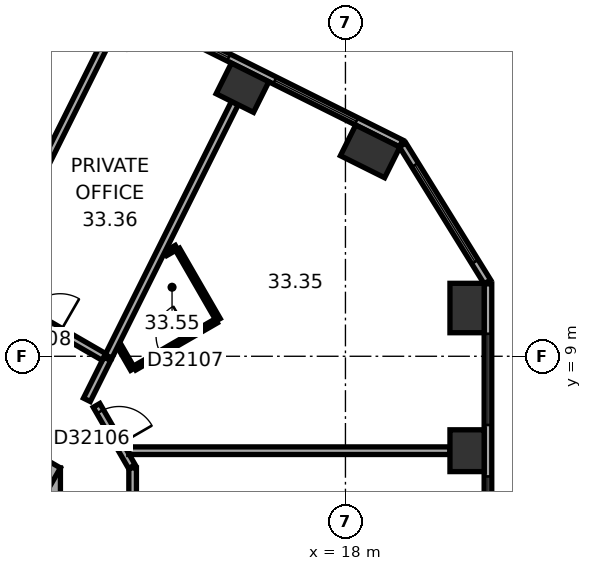
"""IFC4 building model, lengths in metres.
Left out: names, types, materials, properties, quantities, classifications, styles, units other than length and angle.
Written with IfcOpenShell. Run it as: python <this file> out.ifc"""

import sys

from ifc_helpers import new_model, si_unit, direction, frame, frame_2d, origin, origin_2d, place, context, subcontext, project, spatial, rectangle, extrude, element, fill, save


model = new_model("IFC4")
c1 = context("Model", 3, precision=1e-05, world=origin(), true_north=direction((0.0, 1.0)))
c2 = subcontext(c1, "Body", "Model", "MODEL_VIEW")
j1 = project(units=[si_unit("LENGTHUNIT", "METRE"), si_unit("PLANEANGLEUNIT", "RADIAN")], contexts=[c1])
p1 = place(None, origin())
s1 = spatial("IfcSite", under=j1, at=p1, CompositionType="ELEMENT")
p2 = place(p1, origin())
s2 = spatial("IfcBuilding", under=s1, at=p2, CompositionType="ELEMENT")
p3 = place(p2, frame((0.0, 0.0, 135.5)))
s3 = spatial("IfcBuildingStorey", under=s2, at=p3, CompositionType="ELEMENT", Elevation=135.5)
p4 = place(p3, frame((21.2, 6.515, 0.0), z_axis=(0.0, 0.0, 1.0), x_axis=(0.0, 1.0, 0.0)))
e1 = element("IfcColumn", 1, at=p4, inside=s3, PredefinedType="COLUMN", context=c2, shape_type="SweptSolid", body=[
    extrude(rectangle(XDim=1.1, YDim=0.9, at=origin_2d()), origin(), (0.0, 0.0, 1.0), 3.7),
])
for number, where, z_axis, x_axis in (
    (2, (21.2, 10.27, 0.0), (0.0, 0.0, 1.0), (0.0, 1.0, 0.0)),
    (3, (18.65, 14.39, 0.0), (0.0, 0.0, 1.0), (-0.895, 0.446, 0.0)),
):
    element("IfcColumn", number, at=place(p3, frame(where, z_axis=z_axis, x_axis=x_axis)), inside=s3, PredefinedType="COLUMN", context=c2, shape_type="SweptSolid", body=[
        extrude(rectangle(XDim=1.3, YDim=0.9, at=origin_2d()), origin(), (0.0, 0.0, 1.0), 3.7),
    ])
p5 = place(p3, frame((15.29, 16.065, 0.0), z_axis=(0.0, 0.0, 1.0), x_axis=(-0.894934361602, 0.44619781311, 0.0)))
e4 = element("IfcColumn", 4, at=p5, inside=s3, PredefinedType="COLUMN", context=c2, shape_type="SweptSolid", body=[
    extrude(rectangle(XDim=1.1, YDim=0.9, at=origin_2d()), origin(), (0.0, 0.0, 1.0), 3.7),
])
p6 = place(p3, frame((10.0, -6.062, 0.0), z_axis=(0.0, 0.0, 1.0), x_axis=(0.0, 1.0, 0.0)))
e5 = element("IfcWall", 5, at=p6, inside=s3, PredefinedType="SHEAR", context=c2, shape_type="SweptSolid", body=[
    extrude(rectangle(XDim=12.125, YDim=1.0, at=frame_2d((6.062, 0.0))), origin(), (0.0, 0.0, 1.0), 3.7),
])
p7 = place(p6, frame((6.262, 0.0, 0.0)))
e6 = element("IfcOpeningElement", 6, at=p7, cuts=e5, PredefinedType="OPENING", context=c2, shape_type="SweptSolid", body=[
    extrude(rectangle(XDim=1.5, YDim=2.1, at=frame_2d((0.75, 1.05))), frame((0.0, 0.51, 0.0), z_axis=(0.0, -1.0, 0.0), x_axis=(1.0, 0.0, 0.0)), (0.0, 0.0, 1.0), 1.02),
])
p8 = place(p6, frame((1.712, 0.0, 0.0)))
e7 = element("IfcOpeningElement", 7, at=p8, cuts=e5, PredefinedType="OPENING", context=c2, shape_type="SweptSolid", body=[
    extrude(rectangle(XDim=1.1, YDim=2.1, at=frame_2d((0.55, 1.05))), frame((0.0, 0.51, 0.0), z_axis=(0.0, -1.0, 0.0), x_axis=(1.0, 0.0, 0.0)), (0.0, 0.0, 1.0), 1.02),
])
p9 = place(p6, frame((4.312, 0.0, 0.0)))
e8 = element("IfcOpeningElement", 8, at=p9, cuts=e5, PredefinedType="OPENING", context=c2, shape_type="SweptSolid", body=[
    extrude(rectangle(XDim=1.1, YDim=2.1, at=frame_2d((0.55, 1.05))), frame((0.0, 0.51, 0.0), z_axis=(0.0, -1.0, 0.0), x_axis=(1.0, 0.0, 0.0)), (0.0, 0.0, 1.0), 1.02),
])
p10 = place(p3, frame((10.25, 5.629, 0.0), z_axis=(0.0, 0.0, 1.0), x_axis=(-0.866022616891, 0.50000482701, 0.0)))
e9 = element("IfcWall", 9, at=p10, inside=s3, PredefinedType="SHEAR", context=c2, shape_type="SweptSolid", body=[
    extrude(rectangle(XDim=12.125, YDim=1.0, at=frame_2d((6.062, 0.0))), origin(), (0.0, 0.0, 1.0), 3.7),
])
p11 = place(p10, frame((2.612, 0.0, 0.0)))
e10 = element("IfcOpeningElement", 10, at=p11, cuts=e9, PredefinedType="OPENING", context=c2, shape_type="SweptSolid", body=[
    extrude(rectangle(XDim=1.1, YDim=2.1, at=frame_2d((0.55, 1.05))), frame((0.0, 0.51, 0.0), z_axis=(0.0, -1.0, 0.0), x_axis=(1.0, 0.0, 0.0)), (0.0, 0.0, 1.0), 1.02),
])
p12 = place(p10, frame((5.212, 0.0, 0.0)))
e11 = element("IfcOpeningElement", 11, at=p12, cuts=e9, PredefinedType="OPENING", context=c2, shape_type="SweptSolid", body=[
    extrude(rectangle(XDim=1.1, YDim=2.1, at=frame_2d((0.55, 1.05))), frame((0.0, 0.51, 0.0), z_axis=(0.0, -1.0, 0.0), x_axis=(1.0, 0.0, 0.0)), (0.0, 0.0, 1.0), 1.02),
])
p13 = place(p10, frame((7.812, 0.0, 0.0)))
e12 = element("IfcOpeningElement", 12, at=p13, cuts=e9, PredefinedType="OPENING", context=c2, shape_type="SweptSolid", body=[
    extrude(rectangle(XDim=1.1, YDim=2.1, at=frame_2d((0.55, 1.05))), frame((0.0, 0.51, 0.0), z_axis=(0.0, -1.0, 0.0), x_axis=(1.0, 0.0, 0.0)), (0.0, 0.0, 1.0), 1.02),
])
p14 = place(p3, frame((21.75, -9.138, 0.0), z_axis=(0.0, 0.0, 1.0), x_axis=(0.0, 1.0, 0.0)))
e13 = element("IfcWall", 13, at=p14, inside=s3, PredefinedType="STANDARD", context=c2, shape_type="SweptSolid", body=[
    extrude(rectangle(XDim=20.044, YDim=0.2, at=frame_2d((10.022, 0.0))), origin(), (0.0, 0.0, 1.0), 3.7),
])
p15 = place(p14, frame((1.314, 0.0, 0.9)))
e14 = element("IfcOpeningElement", 14, at=p15, cuts=e13, PredefinedType="OPENING", context=c2, shape_type="SweptSolid", body=[
    extrude(rectangle(XDim=2.4, YDim=2.0, at=frame_2d((1.2, 1.0))), frame((0.0, 0.11, 0.0), z_axis=(0.0, -1.0, 0.0), x_axis=(1.0, 0.0, 0.0)), (0.0, 0.0, 1.0), 0.22),
])
p16 = place(p14, frame((5.069, 0.0, 0.9)))
e15 = element("IfcOpeningElement", 15, at=p16, cuts=e13, PredefinedType="OPENING", context=c2, shape_type="SweptSolid", body=[
    extrude(rectangle(XDim=2.4, YDim=2.0, at=frame_2d((1.2, 1.0))), frame((0.0, 0.11, 0.0), z_axis=(0.0, -1.0, 0.0), x_axis=(1.0, 0.0, 0.0)), (0.0, 0.0, 1.0), 0.22),
])
p17 = place(p14, frame((8.823, 0.0, 0.9)))
e16 = element("IfcOpeningElement", 16, at=p17, cuts=e13, PredefinedType="OPENING", context=c2, shape_type="SweptSolid", body=[
    extrude(rectangle(XDim=2.4, YDim=2.0, at=frame_2d((1.2, 1.0))), frame((0.0, 0.11, 0.0), z_axis=(0.0, -1.0, 0.0), x_axis=(1.0, 0.0, 0.0)), (0.0, 0.0, 1.0), 0.22),
])
p18 = place(p14, frame((12.577, 0.0, 0.9)))
e17 = element("IfcOpeningElement", 17, at=p18, cuts=e13, PredefinedType="OPENING", context=c2, shape_type="SweptSolid", body=[
    extrude(rectangle(XDim=2.4, YDim=2.0, at=frame_2d((1.2, 1.0))), frame((0.0, 0.11, 0.0), z_axis=(0.0, -1.0, 0.0), x_axis=(1.0, 0.0, 0.0)), (0.0, 0.0, 1.0), 0.22),
])
p19 = place(p14, frame((16.331, 0.0, 0.9)))
e18 = element("IfcOpeningElement", 18, at=p19, cuts=e13, PredefinedType="OPENING", context=c2, shape_type="SweptSolid", body=[
    extrude(rectangle(XDim=2.4, YDim=2.0, at=frame_2d((1.2, 1.0))), frame((0.0, 0.11, 0.0), z_axis=(0.0, -1.0, 0.0), x_axis=(1.0, 0.0, 0.0)), (0.0, 0.0, 1.0), 0.22),
])
p20 = place(p3, frame((21.735, 10.958, 0.0), z_axis=(0.0, 0.0, 1.0), x_axis=(-0.526213807775, 0.850352296702, 0.0)))
e19 = element("IfcWall", 19, at=p20, inside=s3, PredefinedType="STANDARD", context=c2, shape_type="SweptSolid", body=[
    extrude(rectangle(XDim=4.238, YDim=0.2, at=frame_2d((2.119, 0.0))), origin(), (0.0, 0.0, 1.0), 3.7),
])
p21 = place(p20, frame((0.619, 0.0, 0.9)))
e20 = element("IfcOpeningElement", 20, at=p21, cuts=e19, PredefinedType="OPENING", context=c2, shape_type="SweptSolid", body=[
    extrude(rectangle(XDim=3.0, YDim=2.0, at=frame_2d((1.5, 1.0))), frame((0.0, 0.11, 0.0), z_axis=(0.0, -1.0, 0.0), x_axis=(1.0, 0.0, 0.0)), (0.0, 0.0, 1.0), 0.22),
])
p22 = place(p3, frame((19.464, 14.599, 0.0), z_axis=(0.0, 0.0, 1.0), x_axis=(-0.894935755043, 0.446195018289, 0.0)))
e21 = element("IfcWall", 21, at=p22, inside=s3, PredefinedType="STANDARD", context=c2, shape_type="SweptSolid", body=[
    extrude(rectangle(XDim=20.044, YDim=0.2, at=frame_2d((10.022, 0.0))), origin(), (0.0, 0.0, 1.0), 3.7),
])
p23 = place(p22, frame((1.313, 0.0, 0.9)))
e22 = element("IfcOpeningElement", 22, at=p23, cuts=e21, PredefinedType="OPENING", context=c2, shape_type="SweptSolid", body=[
    extrude(rectangle(XDim=2.4, YDim=2.0, at=frame_2d((1.2, 1.0))), frame((0.0, 0.11, 0.0), z_axis=(0.0, -1.0, 0.0), x_axis=(1.0, 0.0, 0.0)), (0.0, 0.0, 1.0), 0.22),
])
p24 = place(p22, frame((5.067, 0.0, 0.9)))
e23 = element("IfcOpeningElement", 23, at=p24, cuts=e21, PredefinedType="OPENING", context=c2, shape_type="SweptSolid", body=[
    extrude(rectangle(XDim=2.4, YDim=2.0, at=frame_2d((1.2, 1.0))), frame((0.0, 0.11, 0.0), z_axis=(0.0, -1.0, 0.0), x_axis=(1.0, 0.0, 0.0)), (0.0, 0.0, 1.0), 0.22),
])
p25 = place(p22, frame((8.821, 0.0, 0.9)))
e24 = element("IfcOpeningElement", 24, at=p25, cuts=e21, PredefinedType="OPENING", context=c2, shape_type="SweptSolid", body=[
    extrude(rectangle(XDim=2.4, YDim=2.0, at=frame_2d((1.2, 1.0))), frame((0.0, 0.11, 0.0), z_axis=(0.0, -1.0, 0.0), x_axis=(1.0, 0.0, 0.0)), (0.0, 0.0, 1.0), 0.22),
])
p26 = place(p22, frame((12.575, 0.0, 0.9)))
e25 = element("IfcOpeningElement", 25, at=p26, cuts=e21, PredefinedType="OPENING", context=c2, shape_type="SweptSolid", body=[
    extrude(rectangle(XDim=2.4, YDim=2.0, at=frame_2d((1.2, 1.0))), frame((0.0, 0.11, 0.0), z_axis=(0.0, -1.0, 0.0), x_axis=(1.0, 0.0, 0.0)), (0.0, 0.0, 1.0), 0.22),
])
p27 = place(p22, frame((16.329, 0.0, 0.9)))
e26 = element("IfcOpeningElement", 26, at=p27, cuts=e21, PredefinedType="OPENING", context=c2, shape_type="SweptSolid", body=[
    extrude(rectangle(XDim=2.4, YDim=2.0, at=frame_2d((1.2, 1.0))), frame((0.0, 0.11, 0.0), z_axis=(0.0, -1.0, 0.0), x_axis=(1.0, 0.0, 0.0)), (0.0, 0.0, 1.0), 0.22),
])
p28 = place(p3, frame((11.196, 7.854, 0.0), z_axis=(0.0, 0.0, 1.0), x_axis=(0.446241040303, 0.894912808015, 0.0)))
e27 = element("IfcWall", 27, at=p28, inside=s3, PredefinedType="PARTITIONING", context=c2, shape_type="SweptSolid", body=[
    extrude(rectangle(XDim=1.205, YDim=0.2, at=frame_2d((0.603, 0.0))), origin(), (0.0, 0.0, 1.0), 3.35),
])
p29 = place(p3, frame((11.646, 8.981, 0.0), z_axis=(0.0, 0.0, 1.0), x_axis=(-0.866027142779, 0.499996987961, 0.0)))
e28 = element("IfcWall", 28, at=p29, inside=s3, PredefinedType="PARTITIONING", context=c2, shape_type="SweptSolid", body=[
    extrude(rectangle(XDim=9.597, YDim=0.2, at=frame_2d((4.798, 0.0))), origin(), (0.0, 0.0, 1.0), 3.35),
])
p30 = place(p29, frame((1.331, 0.0, 0.0)))
e29 = element("IfcOpeningElement", 29, at=p30, cuts=e28, PredefinedType="OPENING", context=c2, shape_type="SweptSolid", body=[
    extrude(rectangle(XDim=1.0, YDim=2.1, at=frame_2d((0.5, 1.05))), frame((0.0, 0.11, 0.0), z_axis=(0.0, -1.0, 0.0), x_axis=(1.0, 0.0, 0.0)), (0.0, 0.0, 1.0), 0.22),
])
p31 = place(p29, frame((5.042, 0.0, 0.0)))
e30 = element("IfcOpeningElement", 30, at=p31, cuts=e28, PredefinedType="OPENING", context=c2, shape_type="SweptSolid", body=[
    extrude(rectangle(XDim=1.0, YDim=2.1, at=frame_2d((0.5, 1.05))), frame((0.0, 0.11, 0.0), z_axis=(0.0, -1.0, 0.0), x_axis=(1.0, 0.0, 0.0)), (0.0, 0.0, 1.0), 0.22),
])
p32 = place(p29, frame((8.01, 0.0, 0.0)))
e31 = element("IfcOpeningElement", 31, at=p32, cuts=e28, PredefinedType="OPENING", context=c2, shape_type="SweptSolid", body=[
    extrude(rectangle(XDim=1.0, YDim=2.1, at=frame_2d((0.5, 1.05))), frame((0.0, 0.11, 0.0), z_axis=(0.0, -1.0, 0.0), x_axis=(1.0, 0.0, 0.0)), (0.0, 0.0, 1.0), 0.22),
])
p33 = place(p3, frame((11.73, 17.338, 0.0), z_axis=(0.0, 0.0, 1.0), x_axis=(-0.446193589186, -0.894936467561, 0.0)))
e32 = element("IfcWall", 32, at=p33, inside=s3, PredefinedType="PARTITIONING", context=c2, shape_type="SweptSolid", body=[
    extrude(rectangle(XDim=7.183, YDim=0.2, at=frame_2d((3.591, 0.0))), origin(), (0.0, 0.0, 1.0), 2.55),
])
p34 = place(p3, frame((12.38, 6.097, 0.0), z_axis=(0.0, 0.0, 1.0), x_axis=(-0.499964847546, 0.866045698112, 0.0)))
e33 = element("IfcWall", 33, at=p34, inside=s3, PredefinedType="PARTITIONING", context=c2, shape_type="SweptSolid", body=[
    extrude(rectangle(XDim=1.86, YDim=0.2, at=frame_2d((0.93, 0.0))), origin(), (0.0, 0.0, 1.0), 3.35),
])
p35 = place(p34, frame((0.672, 0.0, 0.0)))
e34 = element("IfcOpeningElement", 34, at=p35, cuts=e33, PredefinedType="OPENING", context=c2, shape_type="SweptSolid", body=[
    extrude(rectangle(XDim=1.0, YDim=2.1, at=frame_2d((0.5, 1.05))), frame((0.0, 0.11, 0.0), z_axis=(0.0, -1.0, 0.0), x_axis=(1.0, 0.0, 0.0)), (0.0, 0.0, 1.0), 0.22),
])
p36 = place(p3, frame((12.4, 0.201, 0.0), z_axis=(0.0, 0.0, 1.0), x_axis=(0.0, 1.0, 0.0)))
e35 = element("IfcWall", 35, at=p36, inside=s3, PredefinedType="PARTITIONING", context=c2, shape_type="SweptSolid", body=[
    extrude(rectangle(XDim=5.861, YDim=0.2, at=frame_2d((2.931, 0.0))), origin(), (0.0, 0.0, 1.0), 3.35),
])
p37 = place(p36, frame((3.711, 0.0, 0.0)))
e36 = element("IfcOpeningElement", 36, at=p37, cuts=e35, PredefinedType="OPENING", context=c2, shape_type="SweptSolid", body=[
    extrude(rectangle(XDim=1.0, YDim=2.1, at=frame_2d((0.5, 1.05))), frame((0.0, 0.11, 0.0), z_axis=(0.0, -1.0, 0.0), x_axis=(1.0, 0.0, 0.0)), (0.0, 0.0, 1.0), 0.22),
])
p38 = place(p3, frame((12.401, 8.661, 0.0), z_axis=(0.0, 0.0, 1.0), x_axis=(-0.499831418649, 0.866122712398, 0.0)))
e37 = element("IfcWall", 37, at=p38, inside=s3, PredefinedType="PARTITIONING", context=c2, shape_type="SweptSolid", body=[
    extrude(rectangle(XDim=0.711, YDim=0.12, at=frame_2d((0.355, 0.0))), origin(), (0.0, 0.0, 1.0), 3.35),
])
p39 = place(p3, frame((13.269, 11.702, 0.0), z_axis=(0.0, 0.0, 1.0), x_axis=(0.865936922628, 0.500153222552, 0.0)))
e38 = element("IfcWall", 38, at=p39, inside=s3, PredefinedType="PARTITIONING", context=c2, shape_type="SweptSolid", body=[
    extrude(rectangle(XDim=0.327, YDim=0.12, at=frame_2d((0.164, 0.0))), origin(), (0.0, 0.0, 1.0), 3.35),
])
p40 = place(p3, frame((13.583, 11.814, 0.0), z_axis=(0.0, 0.0, 1.0), x_axis=(0.500028586798, -0.86600889856, 0.0)))
e39 = element("IfcWall", 39, at=p40, inside=s3, PredefinedType="PARTITIONING", context=c2, shape_type="SweptSolid", body=[
    extrude(rectangle(XDim=2.14, YDim=0.12, at=frame_2d((1.07, 0.0))), origin(), (0.0, 0.0, 1.0), 3.35),
])
p41 = place(p3, frame((14.601, 9.931, 0.0), z_axis=(0.0, 0.0, 1.0), x_axis=(-0.866023285932, -0.50000366821, 0.0)))
e40 = element("IfcWall", 40, at=p41, inside=s3, PredefinedType="PARTITIONING", context=c2, shape_type="SweptSolid", body=[
    extrude(rectangle(XDim=2.48, YDim=0.12, at=frame_2d((1.24, 0.0))), origin(), (0.0, 0.0, 1.0), 3.35),
])
p42 = place(p41, frame((0.79, 0.0, 0.0)))
e41 = element("IfcOpeningElement", 41, at=p42, cuts=e40, PredefinedType="OPENING", context=c2, shape_type="SweptSolid", body=[
    extrude(rectangle(XDim=0.9, YDim=2.1, at=frame_2d((0.45, 1.05))), frame((0.0, 0.07, 0.0), z_axis=(0.0, -1.0, 0.0), x_axis=(1.0, 0.0, 0.0)), (0.0, 0.0, 1.0), 0.14),
])
p43 = place(p3, frame((15.09, 15.663, 0.0), z_axis=(0.0, 0.0, 1.0), x_axis=(-0.446203977428, -0.89493128816, 0.0)))
e42 = element("IfcWall", 42, at=p43, inside=s3, PredefinedType="PARTITIONING", context=c2, shape_type="SweptSolid", body=[
    extrude(rectangle(XDim=7.45, YDim=0.2, at=frame_2d((3.725, 0.0))), origin(), (0.0, 0.0, 1.0), 3.35),
])
p44 = place(p3, frame((20.75, 6.515, 0.0), z_axis=(0.0, 0.0, 1.0), x_axis=(-1.0, 0.0, 0.0)))
e43 = element("IfcWall", 43, at=p44, inside=s3, PredefinedType="PARTITIONING", context=c2, shape_type="SweptSolid", body=[
    extrude(rectangle(XDim=8.452, YDim=0.2, at=frame_2d((4.226, 0.0))), origin(), (0.0, 0.0, 1.0), 3.35),
])
p45 = place(p18, origin())
e44 = element("IfcWindow", 44, at=p45, inside=s3, PartitioningType="SINGLE_PANEL", PredefinedType="WINDOW", context=c2, shape_type="SweptSolid", body=[
    extrude(rectangle(XDim=2.4, YDim=2.0, at=frame_2d((1.2, 1.0))), frame((0.0, 0.03, 0.0), z_axis=(0.0, -1.0, 0.0), x_axis=(1.0, 0.0, 0.0)), (0.0, 0.0, 1.0), 0.06),
])
fill(e17, e44)
p46 = place(p19, origin())
e45 = element("IfcWindow", 45, at=p46, inside=s3, PartitioningType="SINGLE_PANEL", PredefinedType="WINDOW", context=c2, shape_type="SweptSolid", body=[
    extrude(rectangle(XDim=2.4, YDim=2.0, at=frame_2d((1.2, 1.0))), frame((0.0, 0.03, 0.0), z_axis=(0.0, -1.0, 0.0), x_axis=(1.0, 0.0, 0.0)), (0.0, 0.0, 1.0), 0.06),
])
fill(e18, e45)
p47 = place(p21, origin())
e46 = element("IfcWindow", 46, at=p47, inside=s3, PartitioningType="SINGLE_PANEL", PredefinedType="WINDOW", context=c2, shape_type="SweptSolid", body=[
    extrude(rectangle(XDim=3.0, YDim=2.0, at=frame_2d((1.5, 1.0))), frame((0.0, 0.03, 0.0), z_axis=(0.0, -1.0, 0.0), x_axis=(1.0, 0.0, 0.0)), (0.0, 0.0, 1.0), 0.06),
])
fill(e20, e46)
p48 = place(p23, origin())
e47 = element("IfcWindow", 47, at=p48, inside=s3, PartitioningType="SINGLE_PANEL", PredefinedType="WINDOW", context=c2, shape_type="SweptSolid", body=[
    extrude(rectangle(XDim=2.4, YDim=2.0, at=frame_2d((1.2, 1.0))), frame((0.0, 0.03, 0.0), z_axis=(0.0, -1.0, 0.0), x_axis=(1.0, 0.0, 0.0)), (0.0, 0.0, 1.0), 0.06),
])
fill(e22, e47)
p49 = place(p24, origin())
e48 = element("IfcWindow", 48, at=p49, inside=s3, PartitioningType="SINGLE_PANEL", PredefinedType="WINDOW", context=c2, shape_type="SweptSolid", body=[
    extrude(rectangle(XDim=2.4, YDim=2.0, at=frame_2d((1.2, 1.0))), frame((0.0, 0.03, 0.0), z_axis=(0.0, -1.0, 0.0), x_axis=(1.0, 0.0, 0.0)), (0.0, 0.0, 1.0), 0.06),
])
fill(e23, e48)
p50 = place(p35, origin())
e49 = element("IfcDoor", 49, at=p50, inside=s3, OperationType="SINGLE_SWING_LEFT", PredefinedType="DOOR", context=c2, shape_type="SweptSolid", body=[
    extrude(rectangle(XDim=1.0, YDim=2.1, at=frame_2d((0.5, 1.05))), frame((0.0, 0.025, 0.0), z_axis=(0.0, -1.0, 0.0), x_axis=(1.0, 0.0, 0.0)), (0.0, 0.0, 1.0), 0.05),
])
fill(e34, e49)
p51 = place(p42, origin())
e50 = element("IfcDoor", 50, at=p51, inside=s3, OperationType="SINGLE_SWING_LEFT", PredefinedType="DOOR", context=c2, shape_type="SweptSolid", body=[
    extrude(rectangle(XDim=0.9, YDim=2.1, at=frame_2d((0.45, 1.05))), frame((0.0, 0.025, 0.0), z_axis=(0.0, -1.0, 0.0), x_axis=(1.0, 0.0, 0.0)), (0.0, 0.0, 1.0), 0.05),
])
fill(e41, e50)
p52 = place(p30, origin())
e51 = element("IfcDoor", 51, at=p52, inside=s3, OperationType="SINGLE_SWING_LEFT", PredefinedType="DOOR", context=c2, shape_type="SweptSolid", body=[
    extrude(rectangle(XDim=1.0, YDim=2.1, at=frame_2d((0.5, 1.05))), frame((0.0, 0.025, 0.0), z_axis=(0.0, -1.0, 0.0), x_axis=(1.0, 0.0, 0.0)), (0.0, 0.0, 1.0), 0.05),
])
fill(e29, e51)
save(model, sys.argv[1])
